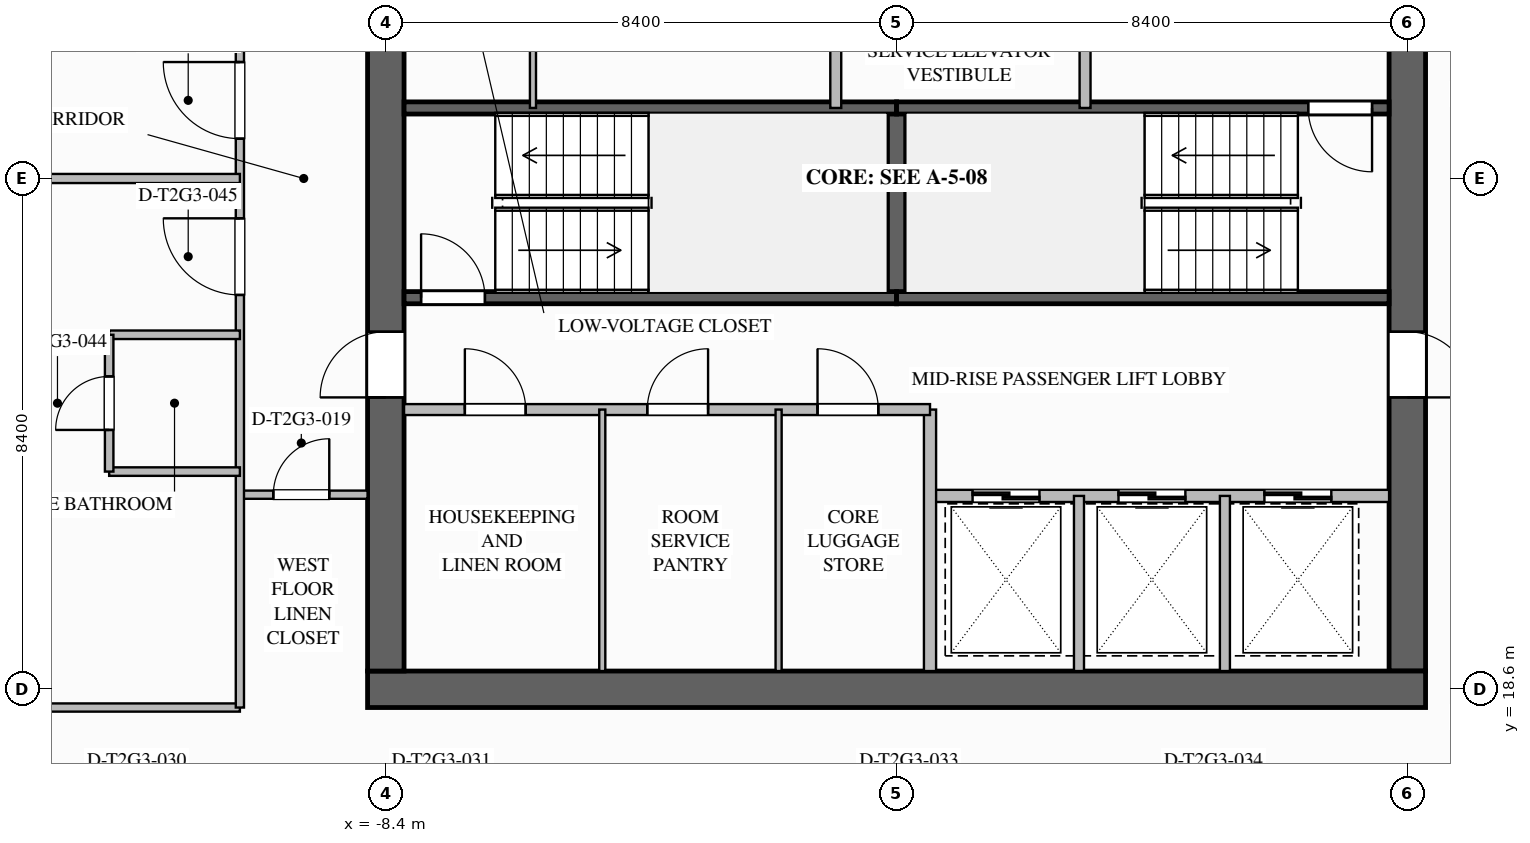
"""IFC4 building model, lengths in metres.
Left out: names, types, materials, properties, quantities, classifications, styles, units other than length and angle.
Written with IfcOpenShell. Run it as: python <this file> out.ifc"""

import sys

from ifc_helpers import new_model, si_unit, direction, frame, frame_2d, origin, place, context, subcontext, project, spatial, rectangle, extrude, element, fill, save


model = new_model("IFC4")
c1 = context("Model", 3, precision=1e-05, world=origin(), true_north=direction((0.0, 1.0)))
c2 = subcontext(c1, "Body", "Model", "MODEL_VIEW")
j1 = project(units=[si_unit("LENGTHUNIT", "METRE"), si_unit("PLANEANGLEUNIT", "RADIAN")], contexts=[c1])
p1 = place(None, origin())
s1 = spatial("IfcSite", under=j1, at=p1, CompositionType="ELEMENT")
p2 = place(p1, origin())
s2 = spatial("IfcBuilding", under=s1, at=p2, CompositionType="ELEMENT")
p3 = place(p2, frame((0.0, 0.0, 119.8)))
s3 = spatial("IfcBuildingStorey", under=s2, at=p3, CompositionType="ELEMENT", Elevation=119.8)
p4 = place(p3, frame((8.4, 35.1, 0.0), z_axis=(0.0, 0.0, 1.0), x_axis=(0.0, -1.0, 0.0)))
e1 = element("IfcWall", 1, at=p4, inside=s3, PredefinedType="SHEAR", context=c2, shape_type="SweptSolid", body=[
    extrude(rectangle(XDim=16.2, YDim=0.6, at=frame_2d((8.1, 0.0))), origin(), (0.0, 0.0, 1.0), 3.5),
])
p5 = place(p4, frame((3.08, 0.0, 0.0)))
e2 = element("IfcOpeningElement", 2, at=p5, cuts=e1, PredefinedType="OPENING", context=c2, shape_type="SweptSolid", body=[
    extrude(rectangle(XDim=1.12, YDim=2.1, at=frame_2d((0.56, 1.05))), frame((0.0, 0.31, 0.0), z_axis=(0.0, -1.0, 0.0), x_axis=(1.0, 0.0, 0.0)), (0.0, 0.0, 1.0), 0.62),
])
p6 = place(p4, frame((10.62, 0.0, 0.0)))
e3 = element("IfcOpeningElement", 3, at=p6, cuts=e1, PredefinedType="OPENING", context=c2, shape_type="SweptSolid", body=[
    extrude(rectangle(XDim=1.08, YDim=2.04, at=frame_2d((0.54, 1.02))), frame((0.0, 0.31, 0.0), z_axis=(0.0, -1.0, 0.0), x_axis=(1.0, 0.0, 0.0)), (0.0, 0.0, 1.0), 0.62),
])
p7 = place(p3, frame((8.7, 18.6, 0.0), z_axis=(0.0, 0.0, 1.0), x_axis=(-1.0, 0.0, 0.0)))
e4 = element("IfcWall", 4, at=p7, inside=s3, PredefinedType="SHEAR", context=c2, shape_type="SweptSolid", body=[
    extrude(rectangle(XDim=17.4, YDim=0.6, at=frame_2d((8.7, 0.0))), origin(), (0.0, 0.0, 1.0), 3.5),
])
p8 = place(p3, frame((-8.4, 18.9, 0.0), z_axis=(0.0, 0.0, 1.0), x_axis=(0.0, 1.0, 0.0)))
e5 = element("IfcWall", 5, at=p8, inside=s3, PredefinedType="SHEAR", context=c2, shape_type="SweptSolid", body=[
    extrude(rectangle(XDim=16.2, YDim=0.6, at=frame_2d((8.1, 0.0))), origin(), (0.0, 0.0, 1.0), 3.5),
])
p9 = place(p8, frame((4.5, 0.0, 0.0)))
e6 = element("IfcOpeningElement", 6, at=p9, cuts=e5, PredefinedType="OPENING", context=c2, shape_type="SweptSolid", body=[
    extrude(rectangle(XDim=1.08, YDim=2.04, at=frame_2d((0.54, 1.02))), frame((0.0, 0.31, 0.0), z_axis=(0.0, -1.0, 0.0), x_axis=(1.0, 0.0, 0.0)), (0.0, 0.0, 1.0), 0.62),
])
p10 = place(p3, frame((0.0, 25.04, 0.0), z_axis=(0.0, 0.0, 1.0), x_axis=(0.0, 1.0, 0.0)))
e7 = element("IfcWall", 7, at=p10, inside=s3, PredefinedType="SOLIDWALL", context=c2, shape_type="SweptSolid", body=[
    extrude(rectangle(XDim=3.12, YDim=0.3, at=frame_2d((1.56, 0.0))), origin(), (0.0, 0.0, 1.0), 3.24),
])
p11 = place(p3, frame((-8.1, 25.04, 0.0), z_axis=(0.0, 0.0, 1.0), x_axis=(1.0, 0.0, 0.0)))
e8 = element("IfcWall", 8, at=p11, inside=s3, PredefinedType="SOLIDWALL", context=c2, shape_type="SweptSolid", body=[
    extrude(rectangle(XDim=8.1, YDim=0.2, at=frame_2d((4.05, 0.0))), origin(), (0.0, 0.0, 1.0), 3.24),
])
p12 = place(p11, frame((0.28, 0.0, 0.0)))
e9 = element("IfcOpeningElement", 9, at=p12, cuts=e8, PredefinedType="OPENING", context=c2, shape_type="SweptSolid", body=[
    extrude(rectangle(XDim=1.05, YDim=2.1, at=frame_2d((0.525, 1.05))), frame((0.0, 0.11, 0.0), z_axis=(0.0, -1.0, 0.0), x_axis=(1.0, 0.0, 0.0)), (0.0, 0.0, 1.0), 0.22),
])
for number, where, z_axis, x_axis in (
    (10, (-8.1, 28.16, 0.0), (0.0, 0.0, 1.0), (1.0, 0.0, 0.0)),
    (11, (0.0, 25.04, 0.0), (0.0, 0.0, 1.0), (1.0, 0.0, 0.0)),
):
    element("IfcWall", number, at=place(p3, frame(where, z_axis=z_axis, x_axis=x_axis)), inside=s3, PredefinedType="SOLIDWALL", context=c2, shape_type="SweptSolid", body=[
        extrude(rectangle(XDim=8.1, YDim=0.2, at=frame_2d((4.05, 0.0))), origin(), (0.0, 0.0, 1.0), 3.24),
    ])
p13 = place(p3, frame((8.1, 28.16, 0.0), z_axis=(0.0, 0.0, 1.0), x_axis=(-1.0, 0.0, 0.0)))
e12 = element("IfcWall", 12, at=p13, inside=s3, PredefinedType="SOLIDWALL", context=c2, shape_type="SweptSolid", body=[
    extrude(rectangle(XDim=8.1, YDim=0.2, at=frame_2d((4.05, 0.0))), origin(), (0.0, 0.0, 1.0), 3.24),
])
p14 = place(p13, frame((0.28, 0.0, 0.0)))
e13 = element("IfcOpeningElement", 13, at=p14, cuts=e12, PredefinedType="OPENING", context=c2, shape_type="SweptSolid", body=[
    extrude(rectangle(XDim=1.05, YDim=2.1, at=frame_2d((0.525, 1.05))), frame((0.0, 0.11, 0.0), z_axis=(0.0, -1.0, 0.0), x_axis=(1.0, 0.0, 0.0)), (0.0, 0.0, 1.0), 0.22),
])
p15 = place(p3, frame((3.1, 28.16, 0.0), z_axis=(0.0, 0.0, 1.0), x_axis=(0.0, 1.0, 0.0)))
e14 = element("IfcWall", 14, at=p15, inside=s3, PredefinedType="SOLIDWALL", context=c2, shape_type="SweptSolid", body=[
    extrude(rectangle(XDim=4.06, YDim=0.18, at=frame_2d((2.03, 0.0))), origin(), (0.0, 0.0, 1.0), 3.24),
])
p16 = place(p15, frame((1.4, 0.0, 0.0)))
e15 = element("IfcOpeningElement", 15, at=p16, cuts=e14, PredefinedType="OPENING", context=c2, shape_type="SweptSolid", body=[
    extrude(rectangle(XDim=1.12, YDim=2.1, at=frame_2d((0.56, 1.05))), frame((0.0, 0.1, 0.0), z_axis=(0.0, -1.0, 0.0), x_axis=(1.0, 0.0, 0.0)), (0.0, 0.0, 1.0), 0.2),
])
p17 = place(p3, frame((-1.0, 28.16, 0.0), z_axis=(0.0, 0.0, 1.0), x_axis=(0.0, 1.0, 0.0)))
e16 = element("IfcWall", 16, at=p17, inside=s3, PredefinedType="SOLIDWALL", context=c2, shape_type="SweptSolid", body=[
    extrude(rectangle(XDim=4.02, YDim=0.18, at=frame_2d((2.01, 0.0))), origin(), (0.0, 0.0, 1.0), 3.24),
])
p18 = place(p17, frame((1.4, 0.0, 0.0)))
e17 = element("IfcOpeningElement", 17, at=p18, cuts=e16, PredefinedType="OPENING", context=c2, shape_type="SweptSolid", body=[
    extrude(rectangle(XDim=1.0, YDim=2.1, at=frame_2d((0.5, 1.05))), frame((0.0, 0.1, 0.0), z_axis=(0.0, -1.0, 0.0), x_axis=(1.0, 0.0, 0.0)), (0.0, 0.0, 1.0), 0.2),
])
p19 = place(p3, frame((-5.98, 28.16, 0.0), z_axis=(0.0, 0.0, 1.0), x_axis=(0.0, 1.0, 0.0)))
e18 = element("IfcWall", 18, at=p19, inside=s3, PredefinedType="PARTITIONING", context=c2, shape_type="SweptSolid", body=[
    extrude(rectangle(XDim=4.06, YDim=0.1, at=frame_2d((2.03, 0.0))), origin(), (0.0, 0.0, 1.0), 3.24),
])
p20 = place(p19, frame((1.2, 0.0, 0.0)))
e19 = element("IfcOpeningElement", 19, at=p20, cuts=e18, PredefinedType="OPENING", context=c2, shape_type="SweptSolid", body=[
    extrude(rectangle(XDim=0.92, YDim=2.1, at=frame_2d((0.46, 1.05))), frame((0.0, 0.06, 0.0), z_axis=(0.0, -1.0, 0.0), x_axis=(1.0, 0.0, 0.0)), (0.0, 0.0, 1.0), 0.12),
])
p21 = place(p3, frame((8.1, 21.78, 0.0), z_axis=(0.0, 0.0, 1.0), x_axis=(-1.0, 0.0, 0.0)))
e20 = element("IfcWall", 20, at=p21, inside=s3, PredefinedType="SOLIDWALL", context=c2, shape_type="SweptSolid", body=[
    extrude(rectangle(XDim=7.55, YDim=0.2, at=frame_2d((3.775, 0.0))), origin(), (0.0, 0.0, 1.0), 3.24),
])
p22 = place(p21, frame((5.75, 0.0, 0.0)))
e21 = element("IfcOpeningElement", 21, at=p22, cuts=e20, PredefinedType="OPENING", context=c2, shape_type="SweptSolid", body=[
    extrude(rectangle(XDim=1.1, YDim=2.2, at=frame_2d((0.55, 1.1))), frame((0.0, 0.11, 0.0), z_axis=(0.0, -1.0, 0.0), x_axis=(1.0, 0.0, 0.0)), (0.0, 0.0, 1.0), 0.22),
])
p23 = place(p21, frame((3.35, 0.0, 0.0)))
e22 = element("IfcOpeningElement", 22, at=p23, cuts=e20, PredefinedType="OPENING", context=c2, shape_type="SweptSolid", body=[
    extrude(rectangle(XDim=1.1, YDim=2.2, at=frame_2d((0.55, 1.1))), frame((0.0, 0.11, 0.0), z_axis=(0.0, -1.0, 0.0), x_axis=(1.0, 0.0, 0.0)), (0.0, 0.0, 1.0), 0.22),
])
p24 = place(p21, frame((0.95, 0.0, 0.0)))
e23 = element("IfcOpeningElement", 23, at=p24, cuts=e20, PredefinedType="OPENING", context=c2, shape_type="SweptSolid", body=[
    extrude(rectangle(XDim=1.1, YDim=2.2, at=frame_2d((0.55, 1.1))), frame((0.0, 0.11, 0.0), z_axis=(0.0, -1.0, 0.0), x_axis=(1.0, 0.0, 0.0)), (0.0, 0.0, 1.0), 0.22),
])
p25 = place(p3, frame((0.55, 18.9, 0.0), z_axis=(0.0, 0.0, 1.0), x_axis=(0.0, 1.0, 0.0)))
e24 = element("IfcWall", 24, at=p25, inside=s3, PredefinedType="SOLIDWALL", context=c2, shape_type="SweptSolid", body=[
    extrude(rectangle(XDim=4.3, YDim=0.2, at=frame_2d((2.15, 0.0))), origin(), (0.0, 0.0, 1.0), 3.24),
])
for number, where, z_axis, x_axis in (
    (25, (3.0, 18.9, 0.0), (0.0, 0.0, 1.0), (0.0, 1.0, 0.0)),
    (26, (5.4, 18.9, 0.0), (0.0, 0.0, 1.0), (0.0, 1.0, 0.0)),
):
    element("IfcWall", number, at=place(p3, frame(where, z_axis=z_axis, x_axis=x_axis)), inside=s3, PredefinedType="PARTITIONING", context=c2, shape_type="SweptSolid", body=[
        extrude(rectangle(XDim=2.88, YDim=0.165, at=frame_2d((1.44, 0.0))), origin(), (0.0, 0.0, 1.0), 3.24),
    ])
p26 = place(p3, frame((-8.1, 23.2, 0.0), z_axis=(0.0, 0.0, 1.0), x_axis=(1.0, 0.0, 0.0)))
e27 = element("IfcWall", 27, at=p26, inside=s3, PredefinedType="SOLIDWALL", context=c2, shape_type="SweptSolid", body=[
    extrude(rectangle(XDim=8.65, YDim=0.18, at=frame_2d((4.325, 0.0))), origin(), (0.0, 0.0, 1.0), 3.24),
])
p27 = place(p26, frame((1.0, 0.0, 0.0)))
e28 = element("IfcOpeningElement", 28, at=p27, cuts=e27, PredefinedType="OPENING", context=c2, shape_type="SweptSolid", body=[
    extrude(rectangle(XDim=1.0, YDim=2.1, at=frame_2d((0.5, 1.05))), frame((0.0, 0.1, 0.0), z_axis=(0.0, -1.0, 0.0), x_axis=(1.0, 0.0, 0.0)), (0.0, 0.0, 1.0), 0.2),
])
p28 = place(p26, frame((4.0, 0.0, 0.0)))
e29 = element("IfcOpeningElement", 29, at=p28, cuts=e27, PredefinedType="OPENING", context=c2, shape_type="SweptSolid", body=[
    extrude(rectangle(XDim=1.0, YDim=2.1, at=frame_2d((0.5, 1.05))), frame((0.0, 0.1, 0.0), z_axis=(0.0, -1.0, 0.0), x_axis=(1.0, 0.0, 0.0)), (0.0, 0.0, 1.0), 0.2),
])
p29 = place(p26, frame((6.8, 0.0, 0.0)))
e30 = element("IfcOpeningElement", 30, at=p29, cuts=e27, PredefinedType="OPENING", context=c2, shape_type="SweptSolid", body=[
    extrude(rectangle(XDim=1.0, YDim=2.1, at=frame_2d((0.5, 1.05))), frame((0.0, 0.1, 0.0), z_axis=(0.0, -1.0, 0.0), x_axis=(1.0, 0.0, 0.0)), (0.0, 0.0, 1.0), 0.2),
])
for number, where, z_axis, x_axis in (
    (31, (-4.84, 18.9, 0.0), (0.0, 0.0, 1.0), (0.0, 1.0, 0.0)),
    (32, (-1.94, 18.9, 0.0), (0.0, 0.0, 1.0), (0.0, 1.0, 0.0)),
):
    element("IfcWall", number, at=place(p3, frame(where, z_axis=z_axis, x_axis=x_axis)), inside=s3, PredefinedType="PARTITIONING", context=c2, shape_type="SweptSolid", body=[
        extrude(rectangle(XDim=4.3, YDim=0.1, at=frame_2d((2.15, 0.0))), origin(), (0.0, 0.0, 1.0), 3.24),
    ])
p30 = place(p3, frame((-10.8, 21.8, 0.0), z_axis=(0.0, 0.0, 1.0), x_axis=(1.0, 0.0, 0.0)))
e33 = element("IfcWall", 33, at=p30, inside=s3, PredefinedType="PARTITIONING", context=c2, shape_type="SweptSolid", body=[
    extrude(rectangle(XDim=2.1, YDim=0.135, at=frame_2d((1.05, 0.0))), origin(), (0.0, 0.0, 1.0), 3.24),
])
p31 = place(p30, frame((0.55, 0.0, 0.0)))
e34 = element("IfcOpeningElement", 34, at=p31, cuts=e33, PredefinedType="OPENING", context=c2, shape_type="SweptSolid", body=[
    extrude(rectangle(XDim=0.92, YDim=2.1, at=frame_2d((0.46, 1.05))), frame((0.0, 0.077, 0.0), z_axis=(0.0, -1.0, 0.0), x_axis=(1.0, 0.0, 0.0)), (0.0, 0.0, 1.0), 0.155),
])
p32 = place(p3, frame((-16.2, 18.3, 0.0), z_axis=(0.0, 0.0, 1.0), x_axis=(1.0, 0.0, 0.0)))
e35 = element("IfcWall", 35, at=p32, inside=s3, PredefinedType="PARTITIONING", context=c2, shape_type="SweptSolid", body=[
    extrude(rectangle(XDim=5.4, YDim=0.135, at=frame_2d((2.7, 0.0))), origin(), (0.0, 0.0, 1.0), 3.24),
])
p33 = place(p3, frame((-10.8, 18.3, 0.0), z_axis=(0.0, 0.0, 1.0), x_axis=(0.0, 1.0, 0.0)))
e36 = element("IfcWall", 36, at=p33, inside=s3, PredefinedType="PARTITIONING", context=c2, shape_type="SweptSolid", body=[
    extrude(rectangle(XDim=17.4, YDim=0.135, at=frame_2d((8.7, 0.0))), origin(), (0.0, 0.0, 1.0), 3.24),
])
p34 = place(p33, frame((6.785, 0.0, 0.0)))
e37 = element("IfcOpeningElement", 37, at=p34, cuts=e36, PredefinedType="OPENING", context=c2, shape_type="SweptSolid", body=[
    extrude(rectangle(XDim=1.26, YDim=2.2, at=frame_2d((0.63, 1.1))), frame((0.0, 0.077, 0.0), z_axis=(0.0, -1.0, 0.0), x_axis=(1.0, 0.0, 0.0)), (0.0, 0.0, 1.0), 0.155),
])
p35 = place(p33, frame((9.355, 0.0, 0.0)))
e38 = element("IfcOpeningElement", 38, at=p35, cuts=e36, PredefinedType="OPENING", context=c2, shape_type="SweptSolid", body=[
    extrude(rectangle(XDim=1.26, YDim=2.2, at=frame_2d((0.63, 1.1))), frame((0.0, 0.077, 0.0), z_axis=(0.0, -1.0, 0.0), x_axis=(1.0, 0.0, 0.0)), (0.0, 0.0, 1.0), 0.155),
])
p36 = place(p3, frame((-26.2, 27.0, 0.0), z_axis=(0.0, 0.0, 1.0), x_axis=(1.0, 0.0, 0.0)))
e39 = element("IfcWall", 39, at=p36, inside=s3, PredefinedType="PARTITIONING", context=c2, shape_type="SweptSolid", body=[
    extrude(rectangle(XDim=15.4, YDim=0.15, at=frame_2d((7.7, 0.0))), origin(), (0.0, 0.0, 1.0), 2.53),
])
for number, where, z_axis, x_axis in (
    (40, (-10.8, 22.18, 0.0), (0.0, 0.0, 1.0), (-1.0, 0.0, 0.0)),
    (41, (-10.8, 24.43, 0.0), (0.0, 0.0, 1.0), (-1.0, 0.0, 0.0)),
):
    element("IfcWall", number, at=place(p3, frame(where, z_axis=z_axis, x_axis=x_axis)), inside=s3, PredefinedType="PLUMBINGWALL", context=c2, shape_type="SweptSolid", body=[
        extrude(rectangle(XDim=2.15, YDim=0.14, at=frame_2d((1.075, 0.0))), origin(), (0.0, 0.0, 1.0), 3.24),
    ])
p37 = place(p3, frame((-12.95, 22.18, 0.0), z_axis=(0.0, 0.0, 1.0), x_axis=(0.0, 1.0, 0.0)))
e42 = element("IfcWall", 42, at=p37, inside=s3, PredefinedType="PLUMBINGWALL", context=c2, shape_type="SweptSolid", body=[
    extrude(rectangle(XDim=2.25, YDim=0.14, at=frame_2d((1.125, 0.0))), origin(), (0.0, 0.0, 1.0), 3.24),
])
p38 = place(p37, frame((0.685, 0.0, 0.0)))
e43 = element("IfcOpeningElement", 43, at=p38, cuts=e42, PredefinedType="OPENING", context=c2, shape_type="SweptSolid", body=[
    extrude(rectangle(XDim=0.88, YDim=2.1, at=frame_2d((0.44, 1.05))), frame((0.0, 0.08, 0.0), z_axis=(0.0, -1.0, 0.0), x_axis=(1.0, 0.0, 0.0)), (0.0, 0.0, 1.0), 0.16),
])
p39 = place(p12, origin())
e44 = element("IfcDoor", 44, at=p39, inside=s3, OperationType="SINGLE_SWING_LEFT", PredefinedType="DOOR", context=c2, shape_type="SweptSolid", body=[
    extrude(rectangle(XDim=1.05, YDim=2.1, at=frame_2d((0.525, 1.05))), frame((0.0, 0.025, 0.0), z_axis=(0.0, -1.0, 0.0), x_axis=(1.0, 0.0, 0.0)), (0.0, 0.0, 1.0), 0.05),
])
fill(e9, e44)
p40 = place(p14, origin())
e45 = element("IfcDoor", 45, at=p40, inside=s3, OperationType="SINGLE_SWING_LEFT", PredefinedType="DOOR", context=c2, shape_type="SweptSolid", body=[
    extrude(rectangle(XDim=1.05, YDim=2.1, at=frame_2d((0.525, 1.05))), frame((0.0, 0.025, 0.0), z_axis=(0.0, -1.0, 0.0), x_axis=(1.0, 0.0, 0.0)), (0.0, 0.0, 1.0), 0.05),
])
fill(e13, e45)
p41 = place(p22, origin())
e46 = element("IfcDoor", 46, at=p41, inside=s3, OperationType="SLIDING_TO_LEFT", PredefinedType="DOOR", context=c2, shape_type="SweptSolid", body=[
    extrude(rectangle(XDim=1.1, YDim=2.2, at=frame_2d((0.55, 1.1))), frame((0.0, 0.025, 0.0), z_axis=(0.0, -1.0, 0.0), x_axis=(1.0, 0.0, 0.0)), (0.0, 0.0, 1.0), 0.05),
])
fill(e21, e46)
p42 = place(p23, origin())
e47 = element("IfcDoor", 47, at=p42, inside=s3, OperationType="SLIDING_TO_LEFT", PredefinedType="DOOR", context=c2, shape_type="SweptSolid", body=[
    extrude(rectangle(XDim=1.1, YDim=2.2, at=frame_2d((0.55, 1.1))), frame((0.0, 0.025, 0.0), z_axis=(0.0, -1.0, 0.0), x_axis=(1.0, 0.0, 0.0)), (0.0, 0.0, 1.0), 0.05),
])
fill(e22, e47)
p43 = place(p24, origin())
e48 = element("IfcDoor", 48, at=p43, inside=s3, OperationType="SLIDING_TO_LEFT", PredefinedType="DOOR", context=c2, shape_type="SweptSolid", body=[
    extrude(rectangle(XDim=1.1, YDim=2.2, at=frame_2d((0.55, 1.1))), frame((0.0, 0.025, 0.0), z_axis=(0.0, -1.0, 0.0), x_axis=(1.0, 0.0, 0.0)), (0.0, 0.0, 1.0), 0.05),
])
fill(e23, e48)
p44 = place(p9, origin())
e49 = element("IfcDoor", 49, at=p44, inside=s3, OperationType="SINGLE_SWING_LEFT", PredefinedType="DOOR", context=c2, shape_type="SweptSolid", body=[
    extrude(rectangle(XDim=1.08, YDim=2.04, at=frame_2d((0.54, 1.02))), frame((0.0, 0.025, 0.0), z_axis=(0.0, -1.0, 0.0), x_axis=(1.0, 0.0, 0.0)), (0.0, 0.0, 1.0), 0.05),
])
fill(e6, e49)
p45 = place(p6, origin())
e50 = element("IfcDoor", 50, at=p45, inside=s3, OperationType="SINGLE_SWING_RIGHT", PredefinedType="DOOR", context=c2, shape_type="SweptSolid", body=[
    extrude(rectangle(XDim=1.08, YDim=2.04, at=frame_2d((0.54, 1.02))), frame((0.0, 0.025, 0.0), z_axis=(0.0, -1.0, 0.0), x_axis=(1.0, 0.0, 0.0)), (0.0, 0.0, 1.0), 0.05),
])
fill(e3, e50)
p46 = place(p27, origin())
e51 = element("IfcDoor", 51, at=p46, inside=s3, OperationType="SINGLE_SWING_LEFT", PredefinedType="DOOR", context=c2, shape_type="SweptSolid", body=[
    extrude(rectangle(XDim=1.0, YDim=2.1, at=frame_2d((0.5, 1.05))), frame((0.0, 0.025, 0.0), z_axis=(0.0, -1.0, 0.0), x_axis=(1.0, 0.0, 0.0)), (0.0, 0.0, 1.0), 0.05),
])
fill(e28, e51)
p47 = place(p28, origin())
e52 = element("IfcDoor", 52, at=p47, inside=s3, OperationType="SINGLE_SWING_RIGHT", PredefinedType="DOOR", context=c2, shape_type="SweptSolid", body=[
    extrude(rectangle(XDim=1.0, YDim=2.1, at=frame_2d((0.5, 1.05))), frame((0.0, 0.025, 0.0), z_axis=(0.0, -1.0, 0.0), x_axis=(1.0, 0.0, 0.0)), (0.0, 0.0, 1.0), 0.05),
])
fill(e29, e52)
p48 = place(p29, origin())
e53 = element("IfcDoor", 53, at=p48, inside=s3, OperationType="SINGLE_SWING_LEFT", PredefinedType="DOOR", context=c2, shape_type="SweptSolid", body=[
    extrude(rectangle(XDim=1.0, YDim=2.1, at=frame_2d((0.5, 1.05))), frame((0.0, 0.025, 0.0), z_axis=(0.0, -1.0, 0.0), x_axis=(1.0, 0.0, 0.0)), (0.0, 0.0, 1.0), 0.05),
])
fill(e30, e53)
p49 = place(p31, origin())
e54 = element("IfcDoor", 54, at=p49, inside=s3, OperationType="SINGLE_SWING_RIGHT", PredefinedType="DOOR", context=c2, shape_type="SweptSolid", body=[
    extrude(rectangle(XDim=0.92, YDim=2.1, at=frame_2d((0.46, 1.05))), frame((0.0, 0.025, 0.0), z_axis=(0.0, -1.0, 0.0), x_axis=(1.0, 0.0, 0.0)), (0.0, 0.0, 1.0), 0.05),
])
fill(e34, e54)
p50 = place(p38, origin())
e55 = element("IfcDoor", 55, at=p50, inside=s3, OperationType="SINGLE_SWING_LEFT", PredefinedType="DOOR", context=c2, shape_type="SweptSolid", body=[
    extrude(rectangle(XDim=0.88, YDim=2.1, at=frame_2d((0.44, 1.05))), frame((0.0, 0.025, 0.0), z_axis=(0.0, -1.0, 0.0), x_axis=(1.0, 0.0, 0.0)), (0.0, 0.0, 1.0), 0.05),
])
fill(e43, e55)
p51 = place(p34, origin())
e56 = element("IfcDoor", 56, at=p51, inside=s3, OperationType="SINGLE_SWING_RIGHT", PredefinedType="DOOR", context=c2, shape_type="SweptSolid", body=[
    extrude(rectangle(XDim=1.26, YDim=2.2, at=frame_2d((0.63, 1.1))), frame((0.0, 0.025, 0.0), z_axis=(0.0, -1.0, 0.0), x_axis=(1.0, 0.0, 0.0)), (0.0, 0.0, 1.0), 0.05),
])
fill(e37, e56)
p52 = place(p35, origin())
e57 = element("IfcDoor", 57, at=p52, inside=s3, OperationType="SINGLE_SWING_RIGHT", PredefinedType="DOOR", context=c2, shape_type="SweptSolid", body=[
    extrude(rectangle(XDim=1.26, YDim=2.2, at=frame_2d((0.63, 1.1))), frame((0.0, 0.025, 0.0), z_axis=(0.0, -1.0, 0.0), x_axis=(1.0, 0.0, 0.0)), (0.0, 0.0, 1.0), 0.05),
])
fill(e38, e57)
save(model, sys.argv[1])
